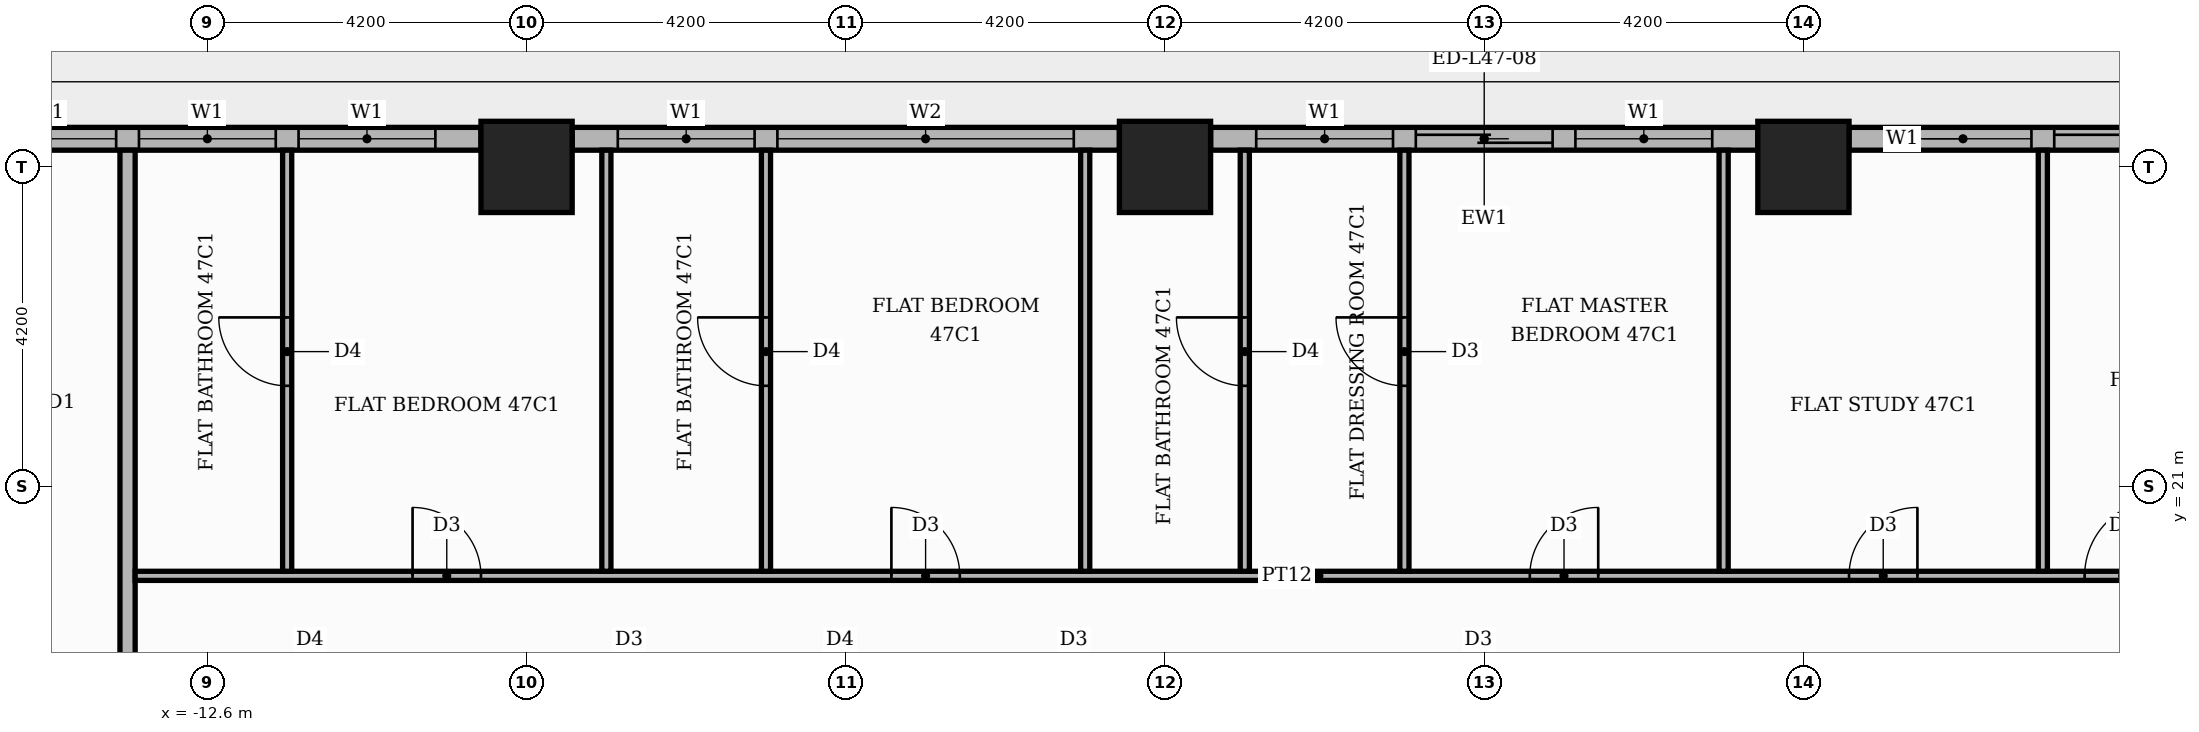
"""IFC4 building model, lengths in metres.
Left out: names, types, materials, properties, quantities, classifications, styles, units other than length and angle.
Written with IfcOpenShell. Run it as: python <this file> out.ifc"""

import sys

from ifc_helpers import new_model, si_unit, direction, frame, frame_2d, origin, origin_2d, place, context, subcontext, project, spatial, rectangle, extrude, element, fill, save


model = new_model("IFC4")
c1 = context("Model", 3, precision=1e-05, world=origin(), true_north=direction((0.0, 1.0)))
c2 = subcontext(c1, "Body", "Model", "MODEL_VIEW")
j1 = project(units=[si_unit("LENGTHUNIT", "METRE"), si_unit("PLANEANGLEUNIT", "RADIAN")], contexts=[c1])
p1 = place(None, origin())
s1 = spatial("IfcSite", under=j1, at=p1, CompositionType="ELEMENT")
p2 = place(p1, origin())
s2 = spatial("IfcBuilding", under=s1, at=p2, CompositionType="ELEMENT")
p3 = place(p2, frame((0.0, 0.0, 200.1)))
s3 = spatial("IfcBuildingStorey", under=s2, at=p3, CompositionType="ELEMENT", Elevation=200.1)
for number, where, z_axis, x_axis in (
    (1, (0.0, 25.2, 0.0), (0.0, 0.0, 1.0), (1.0, 0.0, 0.0)),
    (2, (-8.4, 25.2, 0.0), (0.0, 0.0, 1.0), (1.0, 0.0, 0.0)),
    (3, (8.4, 25.2, 0.0), (0.0, 0.0, 1.0), (1.0, 0.0, 0.0)),
):
    element("IfcColumn", number, at=place(p3, frame(where, z_axis=z_axis, x_axis=x_axis)), inside=s3, PredefinedType="COLUMN", context=c2, shape_type="SweptSolid", body=[
        extrude(rectangle(XDim=1.2, YDim=1.2, at=origin_2d()), origin(), (0.0, 0.0, 1.0), 3.9),
    ])
p4 = place(p3, frame((16.2, 25.57, 0.0), z_axis=(0.0, 0.0, 1.0), x_axis=(-1.0, 0.0, 0.0)))
e4 = element("IfcWall", 4, at=p4, inside=s3, PredefinedType="STANDARD", context=c2, shape_type="SweptSolid", body=[
    extrude(rectangle(XDim=7.2, YDim=0.3, at=frame_2d((3.6, 0.0))), origin(), (0.0, 0.0, 1.0), 3.48),
])
p5 = place(p4, frame((0.6, 0.0, 0.0)))
e5 = element("IfcOpeningElement", 5, at=p5, cuts=e4, PredefinedType="OPENING", context=c2, shape_type="SweptSolid", body=[
    extrude(rectangle(XDim=3.9, YDim=2.4, at=frame_2d((1.95, 1.2))), frame((0.0, 0.16, 0.0), z_axis=(0.0, -1.0, 0.0), x_axis=(1.0, 0.0, 0.0)), (0.0, 0.0, 1.0), 0.32),
])
p6 = place(p4, frame((4.8, 0.0, 0.9)))
e6 = element("IfcOpeningElement", 6, at=p6, cuts=e4, PredefinedType="OPENING", context=c2, shape_type="SweptSolid", body=[
    extrude(rectangle(XDim=1.8, YDim=2.1, at=frame_2d((0.9, 1.05))), frame((0.0, 0.16, 0.0), z_axis=(0.0, -1.0, 0.0), x_axis=(1.0, 0.0, 0.0)), (0.0, 0.0, 1.0), 0.32),
])
p7 = place(p3, frame((7.8, 25.57, 0.0), z_axis=(0.0, 0.0, 1.0), x_axis=(-1.0, 0.0, 0.0)))
e7 = element("IfcWall", 7, at=p7, inside=s3, PredefinedType="STANDARD", context=c2, shape_type="SweptSolid", body=[
    extrude(rectangle(XDim=7.2, YDim=0.3, at=frame_2d((3.6, 0.0))), origin(), (0.0, 0.0, 1.0), 3.48),
])
p8 = place(p7, frame((0.6, 0.0, 0.9)))
e8 = element("IfcOpeningElement", 8, at=p8, cuts=e7, PredefinedType="OPENING", context=c2, shape_type="SweptSolid", body=[
    extrude(rectangle(XDim=1.8, YDim=2.1, at=frame_2d((0.9, 1.05))), frame((0.0, 0.16, 0.0), z_axis=(0.0, -1.0, 0.0), x_axis=(1.0, 0.0, 0.0)), (0.0, 0.0, 1.0), 0.32),
])
p9 = place(p7, frame((2.7, 0.0, 0.0)))
e9 = element("IfcOpeningElement", 9, at=p9, cuts=e7, PredefinedType="OPENING", context=c2, shape_type="SweptSolid", body=[
    extrude(rectangle(XDim=1.8, YDim=2.4, at=frame_2d((0.9, 1.2))), frame((0.0, 0.16, 0.0), z_axis=(0.0, -1.0, 0.0), x_axis=(1.0, 0.0, 0.0)), (0.0, 0.0, 1.0), 0.32),
])
p10 = place(p7, frame((4.8, 0.0, 0.9)))
e10 = element("IfcOpeningElement", 10, at=p10, cuts=e7, PredefinedType="OPENING", context=c2, shape_type="SweptSolid", body=[
    extrude(rectangle(XDim=1.8, YDim=2.1, at=frame_2d((0.9, 1.05))), frame((0.0, 0.16, 0.0), z_axis=(0.0, -1.0, 0.0), x_axis=(1.0, 0.0, 0.0)), (0.0, 0.0, 1.0), 0.32),
])
p11 = place(p3, frame((-0.6, 25.57, 0.0), z_axis=(0.0, 0.0, 1.0), x_axis=(-1.0, 0.0, 0.0)))
e11 = element("IfcWall", 11, at=p11, inside=s3, PredefinedType="STANDARD", context=c2, shape_type="SweptSolid", body=[
    extrude(rectangle(XDim=7.2, YDim=0.3, at=frame_2d((3.6, 0.0))), origin(), (0.0, 0.0, 1.0), 3.48),
])
p12 = place(p11, frame((0.6, 0.0, 0.9)))
e12 = element("IfcOpeningElement", 12, at=p12, cuts=e11, PredefinedType="OPENING", context=c2, shape_type="SweptSolid", body=[
    extrude(rectangle(XDim=3.9, YDim=2.1, at=frame_2d((1.95, 1.05))), frame((0.0, 0.16, 0.0), z_axis=(0.0, -1.0, 0.0), x_axis=(1.0, 0.0, 0.0)), (0.0, 0.0, 1.0), 0.32),
])
p13 = place(p11, frame((4.8, 0.0, 0.9)))
e13 = element("IfcOpeningElement", 13, at=p13, cuts=e11, PredefinedType="OPENING", context=c2, shape_type="SweptSolid", body=[
    extrude(rectangle(XDim=1.8, YDim=2.1, at=frame_2d((0.9, 1.05))), frame((0.0, 0.16, 0.0), z_axis=(0.0, -1.0, 0.0), x_axis=(1.0, 0.0, 0.0)), (0.0, 0.0, 1.0), 0.32),
])
p14 = place(p3, frame((-9.0, 25.57, 0.0), z_axis=(0.0, 0.0, 1.0), x_axis=(-1.0, 0.0, 0.0)))
e14 = element("IfcWall", 14, at=p14, inside=s3, PredefinedType="STANDARD", context=c2, shape_type="SweptSolid", body=[
    extrude(rectangle(XDim=7.2, YDim=0.3, at=frame_2d((3.6, 0.0))), origin(), (0.0, 0.0, 1.0), 3.48),
])
p15 = place(p14, frame((0.6, 0.0, 0.9)))
e15 = element("IfcOpeningElement", 15, at=p15, cuts=e14, PredefinedType="OPENING", context=c2, shape_type="SweptSolid", body=[
    extrude(rectangle(XDim=1.8, YDim=2.1, at=frame_2d((0.9, 1.05))), frame((0.0, 0.16, 0.0), z_axis=(0.0, -1.0, 0.0), x_axis=(1.0, 0.0, 0.0)), (0.0, 0.0, 1.0), 0.32),
])
p16 = place(p14, frame((2.7, 0.0, 0.9)))
e16 = element("IfcOpeningElement", 16, at=p16, cuts=e14, PredefinedType="OPENING", context=c2, shape_type="SweptSolid", body=[
    extrude(rectangle(XDim=1.8, YDim=2.1, at=frame_2d((0.9, 1.05))), frame((0.0, 0.16, 0.0), z_axis=(0.0, -1.0, 0.0), x_axis=(1.0, 0.0, 0.0)), (0.0, 0.0, 1.0), 0.32),
])
p17 = place(p14, frame((4.8, 0.0, 0.9)))
e17 = element("IfcOpeningElement", 17, at=p17, cuts=e14, PredefinedType="OPENING", context=c2, shape_type="SweptSolid", body=[
    extrude(rectangle(XDim=1.8, YDim=2.1, at=frame_2d((0.9, 1.05))), frame((0.0, 0.16, 0.0), z_axis=(0.0, -1.0, 0.0), x_axis=(1.0, 0.0, 0.0)), (0.0, 0.0, 1.0), 0.32),
])
p18 = place(p3, frame((-13.65, 13.75, 0.0), z_axis=(0.0, 0.0, 1.0), x_axis=(0.0, 1.0, 0.0)))
e18 = element("IfcWall", 18, at=p18, inside=s3, PredefinedType="PARTITIONING", context=c2, shape_type="SweptSolid", body=[
    extrude(rectangle(XDim=11.67, YDim=0.2, at=frame_2d((5.835, 0.0))), origin(), (0.0, 0.0, 1.0), 3.48),
])
p19 = place(p3, frame((-13.55, 19.82, 0.0), z_axis=(0.0, 0.0, 1.0), x_axis=(1.0, 0.0, 0.0)))
e19 = element("IfcWall", 19, at=p19, inside=s3, PredefinedType="PARTITIONING", context=c2, shape_type="SweptSolid", body=[
    extrude(rectangle(XDim=31.15, YDim=0.12, at=frame_2d((15.575, 0.0))), origin(), (0.0, 0.0, 1.0), 3.48),
])
p20 = place(p19, frame((25.65, 0.0, 0.0)))
e20 = element("IfcOpeningElement", 20, at=p20, cuts=e19, PredefinedType="OPENING", context=c2, shape_type="SweptSolid", body=[
    extrude(rectangle(XDim=1.0, YDim=2.1, at=frame_2d((0.5, 1.05))), frame((0.0, 0.07, 0.0), z_axis=(0.0, -1.0, 0.0), x_axis=(1.0, 0.0, 0.0)), (0.0, 0.0, 1.0), 0.14),
])
p21 = place(p19, frame((22.55, 0.0, 0.0)))
e21 = element("IfcOpeningElement", 21, at=p21, cuts=e19, PredefinedType="OPENING", context=c2, shape_type="SweptSolid", body=[
    extrude(rectangle(XDim=0.9, YDim=2.1, at=frame_2d((0.45, 1.05))), frame((0.0, 0.07, 0.0), z_axis=(0.0, -1.0, 0.0), x_axis=(1.0, 0.0, 0.0)), (0.0, 0.0, 1.0), 0.14),
])
p22 = place(p19, frame((18.35, 0.0, 0.0)))
e22 = element("IfcOpeningElement", 22, at=p22, cuts=e19, PredefinedType="OPENING", context=c2, shape_type="SweptSolid", body=[
    extrude(rectangle(XDim=0.9, YDim=2.1, at=frame_2d((0.45, 1.05))), frame((0.0, 0.07, 0.0), z_axis=(0.0, -1.0, 0.0), x_axis=(1.0, 0.0, 0.0)), (0.0, 0.0, 1.0), 0.14),
])
p23 = place(p19, frame((9.95, 0.0, 0.0)))
e23 = element("IfcOpeningElement", 23, at=p23, cuts=e19, PredefinedType="OPENING", context=c2, shape_type="SweptSolid", body=[
    extrude(rectangle(XDim=0.9, YDim=2.1, at=frame_2d((0.45, 1.05))), frame((0.0, 0.07, 0.0), z_axis=(0.0, -1.0, 0.0), x_axis=(1.0, 0.0, 0.0)), (0.0, 0.0, 1.0), 0.14),
])
p24 = place(p19, frame((3.65, 0.0, 0.0)))
e24 = element("IfcOpeningElement", 24, at=p24, cuts=e19, PredefinedType="OPENING", context=c2, shape_type="SweptSolid", body=[
    extrude(rectangle(XDim=0.9, YDim=2.1, at=frame_2d((0.45, 1.05))), frame((0.0, 0.07, 0.0), z_axis=(0.0, -1.0, 0.0), x_axis=(1.0, 0.0, 0.0)), (0.0, 0.0, 1.0), 0.14),
])
p25 = place(p3, frame((-11.55, 19.88, 0.0), z_axis=(0.0, 0.0, 1.0), x_axis=(0.0, 1.0, 0.0)))
e25 = element("IfcWall", 25, at=p25, inside=s3, PredefinedType="PARTITIONING", context=c2, shape_type="SweptSolid", body=[
    extrude(rectangle(XDim=5.54, YDim=0.12, at=frame_2d((2.77, 0.0))), origin(), (0.0, 0.0, 1.0), 3.48),
])
p26 = place(p25, frame((2.44, 0.0, 0.0)))
e26 = element("IfcOpeningElement", 26, at=p26, cuts=e25, PredefinedType="OPENING", context=c2, shape_type="SweptSolid", body=[
    extrude(rectangle(XDim=0.9, YDim=2.1, at=frame_2d((0.45, 1.05))), frame((0.0, 0.07, 0.0), z_axis=(0.0, -1.0, 0.0), x_axis=(1.0, 0.0, 0.0)), (0.0, 0.0, 1.0), 0.14),
])
p27 = place(p3, frame((-7.35, 19.88, 0.0), z_axis=(0.0, 0.0, 1.0), x_axis=(0.0, 1.0, 0.0)))
e27 = element("IfcWall", 27, at=p27, inside=s3, PredefinedType="PARTITIONING", context=c2, shape_type="SweptSolid", body=[
    extrude(rectangle(XDim=5.54, YDim=0.12, at=frame_2d((2.77, 0.0))), origin(), (0.0, 0.0, 1.0), 3.48),
])
p28 = place(p3, frame((-5.25, 19.88, 0.0), z_axis=(0.0, 0.0, 1.0), x_axis=(0.0, 1.0, 0.0)))
e28 = element("IfcWall", 28, at=p28, inside=s3, PredefinedType="PARTITIONING", context=c2, shape_type="SweptSolid", body=[
    extrude(rectangle(XDim=5.54, YDim=0.12, at=frame_2d((2.77, 0.0))), origin(), (0.0, 0.0, 1.0), 3.48),
])
p29 = place(p28, frame((2.44, 0.0, 0.0)))
e29 = element("IfcOpeningElement", 29, at=p29, cuts=e28, PredefinedType="OPENING", context=c2, shape_type="SweptSolid", body=[
    extrude(rectangle(XDim=0.9, YDim=2.1, at=frame_2d((0.45, 1.05))), frame((0.0, 0.07, 0.0), z_axis=(0.0, -1.0, 0.0), x_axis=(1.0, 0.0, 0.0)), (0.0, 0.0, 1.0), 0.14),
])
p30 = place(p3, frame((-1.05, 19.88, 0.0), z_axis=(0.0, 0.0, 1.0), x_axis=(0.0, 1.0, 0.0)))
e30 = element("IfcWall", 30, at=p30, inside=s3, PredefinedType="PARTITIONING", context=c2, shape_type="SweptSolid", body=[
    extrude(rectangle(XDim=5.54, YDim=0.12, at=frame_2d((2.77, 0.0))), origin(), (0.0, 0.0, 1.0), 3.48),
])
p31 = place(p3, frame((1.05, 19.88, 0.0), z_axis=(0.0, 0.0, 1.0), x_axis=(0.0, 1.0, 0.0)))
e31 = element("IfcWall", 31, at=p31, inside=s3, PredefinedType="PARTITIONING", context=c2, shape_type="SweptSolid", body=[
    extrude(rectangle(XDim=5.54, YDim=0.12, at=frame_2d((2.77, 0.0))), origin(), (0.0, 0.0, 1.0), 3.48),
])
p32 = place(p31, frame((2.44, 0.0, 0.0)))
e32 = element("IfcOpeningElement", 32, at=p32, cuts=e31, PredefinedType="OPENING", context=c2, shape_type="SweptSolid", body=[
    extrude(rectangle(XDim=0.9, YDim=2.1, at=frame_2d((0.45, 1.05))), frame((0.0, 0.07, 0.0), z_axis=(0.0, -1.0, 0.0), x_axis=(1.0, 0.0, 0.0)), (0.0, 0.0, 1.0), 0.14),
])
p33 = place(p3, frame((3.15, 19.88, 0.0), z_axis=(0.0, 0.0, 1.0), x_axis=(0.0, 1.0, 0.0)))
e33 = element("IfcWall", 33, at=p33, inside=s3, PredefinedType="PARTITIONING", context=c2, shape_type="SweptSolid", body=[
    extrude(rectangle(XDim=5.54, YDim=0.12, at=frame_2d((2.77, 0.0))), origin(), (0.0, 0.0, 1.0), 3.48),
])
p34 = place(p33, frame((2.44, 0.0, 0.0)))
e34 = element("IfcOpeningElement", 34, at=p34, cuts=e33, PredefinedType="OPENING", context=c2, shape_type="SweptSolid", body=[
    extrude(rectangle(XDim=0.9, YDim=2.1, at=frame_2d((0.45, 1.05))), frame((0.0, 0.07, 0.0), z_axis=(0.0, -1.0, 0.0), x_axis=(1.0, 0.0, 0.0)), (0.0, 0.0, 1.0), 0.14),
])
for number, where, z_axis, x_axis in (
    (35, (7.35, 19.88, 0.0), (0.0, 0.0, 1.0), (0.0, 1.0, 0.0)),
    (36, (11.55, 19.88, 0.0), (0.0, 0.0, 1.0), (0.0, 1.0, 0.0)),
):
    element("IfcWall", number, at=place(p3, frame(where, z_axis=z_axis, x_axis=x_axis)), inside=s3, PredefinedType="PARTITIONING", context=c2, shape_type="SweptSolid", body=[
        extrude(rectangle(XDim=5.54, YDim=0.12, at=frame_2d((2.77, 0.0))), origin(), (0.0, 0.0, 1.0), 3.48),
    ])
p35 = place(p5, origin())
e37 = element("IfcDoor", 37, at=p35, inside=s3, OperationType="SLIDING_TO_LEFT", PredefinedType="DOOR", context=c2, shape_type="SweptSolid", body=[
    extrude(rectangle(XDim=3.9, YDim=2.4, at=frame_2d((1.95, 1.2))), frame((0.0, 0.025, 0.0), z_axis=(0.0, -1.0, 0.0), x_axis=(1.0, 0.0, 0.0)), (0.0, 0.0, 1.0), 0.05),
])
fill(e5, e37)
p36 = place(p6, origin())
e38 = element("IfcWindow", 38, at=p36, inside=s3, PartitioningType="SINGLE_PANEL", PredefinedType="WINDOW", context=c2, shape_type="SweptSolid", body=[
    extrude(rectangle(XDim=1.8, YDim=2.1, at=frame_2d((0.9, 1.05))), frame((0.0, 0.03, 0.0), z_axis=(0.0, -1.0, 0.0), x_axis=(1.0, 0.0, 0.0)), (0.0, 0.0, 1.0), 0.06),
])
fill(e6, e38)
p37 = place(p8, origin())
e39 = element("IfcWindow", 39, at=p37, inside=s3, PartitioningType="SINGLE_PANEL", PredefinedType="WINDOW", context=c2, shape_type="SweptSolid", body=[
    extrude(rectangle(XDim=1.8, YDim=2.1, at=frame_2d((0.9, 1.05))), frame((0.0, 0.03, 0.0), z_axis=(0.0, -1.0, 0.0), x_axis=(1.0, 0.0, 0.0)), (0.0, 0.0, 1.0), 0.06),
])
fill(e8, e39)
p38 = place(p9, origin())
e40 = element("IfcDoor", 40, at=p38, inside=s3, OperationType="SLIDING_TO_LEFT", PredefinedType="DOOR", context=c2, shape_type="SweptSolid", body=[
    extrude(rectangle(XDim=1.8, YDim=2.4, at=frame_2d((0.9, 1.2))), frame((0.0, 0.025, 0.0), z_axis=(0.0, -1.0, 0.0), x_axis=(1.0, 0.0, 0.0)), (0.0, 0.0, 1.0), 0.05),
])
fill(e9, e40)
p39 = place(p10, origin())
e41 = element("IfcWindow", 41, at=p39, inside=s3, PartitioningType="SINGLE_PANEL", PredefinedType="WINDOW", context=c2, shape_type="SweptSolid", body=[
    extrude(rectangle(XDim=1.8, YDim=2.1, at=frame_2d((0.9, 1.05))), frame((0.0, 0.03, 0.0), z_axis=(0.0, -1.0, 0.0), x_axis=(1.0, 0.0, 0.0)), (0.0, 0.0, 1.0), 0.06),
])
fill(e10, e41)
p40 = place(p12, origin())
e42 = element("IfcWindow", 42, at=p40, inside=s3, PartitioningType="SINGLE_PANEL", PredefinedType="WINDOW", context=c2, shape_type="SweptSolid", body=[
    extrude(rectangle(XDim=3.9, YDim=2.1, at=frame_2d((1.95, 1.05))), frame((0.0, 0.03, 0.0), z_axis=(0.0, -1.0, 0.0), x_axis=(1.0, 0.0, 0.0)), (0.0, 0.0, 1.0), 0.06),
])
fill(e12, e42)
p41 = place(p13, origin())
e43 = element("IfcWindow", 43, at=p41, inside=s3, PartitioningType="SINGLE_PANEL", PredefinedType="WINDOW", context=c2, shape_type="SweptSolid", body=[
    extrude(rectangle(XDim=1.8, YDim=2.1, at=frame_2d((0.9, 1.05))), frame((0.0, 0.03, 0.0), z_axis=(0.0, -1.0, 0.0), x_axis=(1.0, 0.0, 0.0)), (0.0, 0.0, 1.0), 0.06),
])
fill(e13, e43)
p42 = place(p15, origin())
e44 = element("IfcWindow", 44, at=p42, inside=s3, PartitioningType="SINGLE_PANEL", PredefinedType="WINDOW", context=c2, shape_type="SweptSolid", body=[
    extrude(rectangle(XDim=1.8, YDim=2.1, at=frame_2d((0.9, 1.05))), frame((0.0, 0.03, 0.0), z_axis=(0.0, -1.0, 0.0), x_axis=(1.0, 0.0, 0.0)), (0.0, 0.0, 1.0), 0.06),
])
fill(e15, e44)
p43 = place(p16, origin())
e45 = element("IfcWindow", 45, at=p43, inside=s3, PartitioningType="SINGLE_PANEL", PredefinedType="WINDOW", context=c2, shape_type="SweptSolid", body=[
    extrude(rectangle(XDim=1.8, YDim=2.1, at=frame_2d((0.9, 1.05))), frame((0.0, 0.03, 0.0), z_axis=(0.0, -1.0, 0.0), x_axis=(1.0, 0.0, 0.0)), (0.0, 0.0, 1.0), 0.06),
])
fill(e16, e45)
p44 = place(p17, origin())
e46 = element("IfcWindow", 46, at=p44, inside=s3, PartitioningType="SINGLE_PANEL", PredefinedType="WINDOW", context=c2, shape_type="SweptSolid", body=[
    extrude(rectangle(XDim=1.8, YDim=2.1, at=frame_2d((0.9, 1.05))), frame((0.0, 0.03, 0.0), z_axis=(0.0, -1.0, 0.0), x_axis=(1.0, 0.0, 0.0)), (0.0, 0.0, 1.0), 0.06),
])
fill(e17, e46)
p45 = place(p20, origin())
e47 = element("IfcDoor", 47, at=p45, inside=s3, OperationType="SINGLE_SWING_RIGHT", PredefinedType="DOOR", context=c2, shape_type="SweptSolid", body=[
    extrude(rectangle(XDim=1.0, YDim=2.1, at=frame_2d((0.5, 1.05))), frame((0.0, 0.025, 0.0), z_axis=(0.0, -1.0, 0.0), x_axis=(1.0, 0.0, 0.0)), (0.0, 0.0, 1.0), 0.05),
])
fill(e20, e47)
p46 = place(p21, origin())
e48 = element("IfcDoor", 48, at=p46, inside=s3, OperationType="SINGLE_SWING_RIGHT", PredefinedType="DOOR", context=c2, shape_type="SweptSolid", body=[
    extrude(rectangle(XDim=0.9, YDim=2.1, at=frame_2d((0.45, 1.05))), frame((0.0, 0.025, 0.0), z_axis=(0.0, -1.0, 0.0), x_axis=(1.0, 0.0, 0.0)), (0.0, 0.0, 1.0), 0.05),
])
fill(e21, e48)
p47 = place(p22, origin())
e49 = element("IfcDoor", 49, at=p47, inside=s3, OperationType="SINGLE_SWING_RIGHT", PredefinedType="DOOR", context=c2, shape_type="SweptSolid", body=[
    extrude(rectangle(XDim=0.9, YDim=2.1, at=frame_2d((0.45, 1.05))), frame((0.0, 0.025, 0.0), z_axis=(0.0, -1.0, 0.0), x_axis=(1.0, 0.0, 0.0)), (0.0, 0.0, 1.0), 0.05),
])
fill(e22, e49)
p48 = place(p34, origin())
e50 = element("IfcDoor", 50, at=p48, inside=s3, OperationType="SINGLE_SWING_RIGHT", PredefinedType="DOOR", context=c2, shape_type="SweptSolid", body=[
    extrude(rectangle(XDim=0.9, YDim=2.1, at=frame_2d((0.45, 1.05))), frame((0.0, 0.025, 0.0), z_axis=(0.0, -1.0, 0.0), x_axis=(1.0, 0.0, 0.0)), (0.0, 0.0, 1.0), 0.05),
])
fill(e34, e50)
p49 = place(p32, origin())
e51 = element("IfcDoor", 51, at=p49, inside=s3, OperationType="SINGLE_SWING_RIGHT", PredefinedType="DOOR", context=c2, shape_type="SweptSolid", body=[
    extrude(rectangle(XDim=0.9, YDim=2.1, at=frame_2d((0.45, 1.05))), frame((0.0, 0.025, 0.0), z_axis=(0.0, -1.0, 0.0), x_axis=(1.0, 0.0, 0.0)), (0.0, 0.0, 1.0), 0.05),
])
fill(e32, e51)
p50 = place(p23, origin())
e52 = element("IfcDoor", 52, at=p50, inside=s3, OperationType="SINGLE_SWING_LEFT", PredefinedType="DOOR", context=c2, shape_type="SweptSolid", body=[
    extrude(rectangle(XDim=0.9, YDim=2.1, at=frame_2d((0.45, 1.05))), frame((0.0, 0.025, 0.0), z_axis=(0.0, -1.0, 0.0), x_axis=(1.0, 0.0, 0.0)), (0.0, 0.0, 1.0), 0.05),
])
fill(e23, e52)
p51 = place(p29, origin())
e53 = element("IfcDoor", 53, at=p51, inside=s3, OperationType="SINGLE_SWING_RIGHT", PredefinedType="DOOR", context=c2, shape_type="SweptSolid", body=[
    extrude(rectangle(XDim=0.9, YDim=2.1, at=frame_2d((0.45, 1.05))), frame((0.0, 0.025, 0.0), z_axis=(0.0, -1.0, 0.0), x_axis=(1.0, 0.0, 0.0)), (0.0, 0.0, 1.0), 0.05),
])
fill(e29, e53)
p52 = place(p24, origin())
e54 = element("IfcDoor", 54, at=p52, inside=s3, OperationType="SINGLE_SWING_LEFT", PredefinedType="DOOR", context=c2, shape_type="SweptSolid", body=[
    extrude(rectangle(XDim=0.9, YDim=2.1, at=frame_2d((0.45, 1.05))), frame((0.0, 0.025, 0.0), z_axis=(0.0, -1.0, 0.0), x_axis=(1.0, 0.0, 0.0)), (0.0, 0.0, 1.0), 0.05),
])
fill(e24, e54)
p53 = place(p26, origin())
e55 = element("IfcDoor", 55, at=p53, inside=s3, OperationType="SINGLE_SWING_RIGHT", PredefinedType="DOOR", context=c2, shape_type="SweptSolid", body=[
    extrude(rectangle(XDim=0.9, YDim=2.1, at=frame_2d((0.45, 1.05))), frame((0.0, 0.025, 0.0), z_axis=(0.0, -1.0, 0.0), x_axis=(1.0, 0.0, 0.0)), (0.0, 0.0, 1.0), 0.05),
])
fill(e26, e55)
save(model, sys.argv[1])
